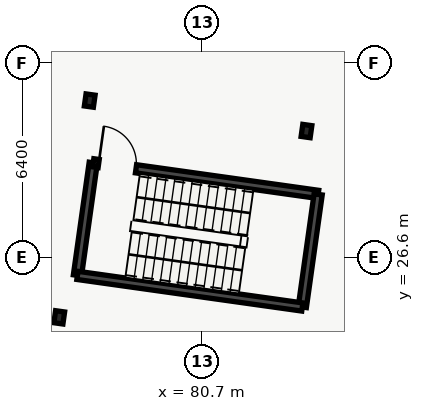
"""IFC4 building model, lengths in metres.
Left out: names, types, materials, properties, quantities, classifications, styles, units other than length and angle.
Written with IfcOpenShell. Run it as: python <this file> out.ifc"""

import sys

from ifc_helpers import new_model, si_unit, direction, frame, frame_2d, origin, origin_2d, place, context, subcontext, project, spatial, rectangle, i_section, extrude, element, fill, save


model = new_model("IFC4")
c1 = context("Model", 3, precision=1e-05, world=origin(), true_north=direction((0.0, 1.0)))
c2 = subcontext(c1, "Body", "Model", "MODEL_VIEW")
j1 = project(units=[si_unit("LENGTHUNIT", "METRE"), si_unit("PLANEANGLEUNIT", "RADIAN")], contexts=[c1])
p1 = place(None, origin())
s1 = spatial("IfcSite", under=j1, at=p1, CompositionType="ELEMENT")
p2 = place(p1, origin())
s2 = spatial("IfcBuilding", under=s1, at=p2, CompositionType="ELEMENT")
p3 = place(p2, frame((0.0, 0.0, -4.8)))
s3 = spatial("IfcBuildingStorey", under=s2, at=p3, CompositionType="ELEMENT", Elevation=-4.8)
for number, where, z_axis, x_axis in (
    (1, (76.002, 24.63, 0.0), (0.0, 0.0, 1.0), (0.99, -0.139, 0.0)),
    (2, (77.004, 31.76, 0.0), (0.0, 0.0, 1.0), (0.99, -0.139, 0.0)),
    (3, (84.134, 30.758, 0.0), (0.0, 0.0, 1.0), (0.99, -0.139, 0.0)),
):
    element("IfcColumn", number, at=place(p3, frame(where, z_axis=z_axis, x_axis=x_axis)), inside=s3, PredefinedType="COLUMN", context=c2, shape_type="SweptSolid", body=[
        extrude(i_section(OverallWidth=0.3, OverallDepth=0.4, WebThickness=0.013, FlangeThickness=0.024, at=origin_2d()), origin(), (0.0, 0.0, 1.0), 4.61),
    ])
p4 = place(p3, frame((76.6, 26.01, 0.0), z_axis=(0.0, 0.0, 1.0), x_axis=(0.139172815303, 0.990268108888, 0.0)))
e4 = element("IfcWall", 4, at=p4, inside=s3, PredefinedType="SHEAR", context=c2, shape_type="SweptSolid", body=[
    extrude(rectangle(XDim=3.74, YDim=0.27, at=frame_2d((1.87, 0.0))), origin(), (0.0, 0.0, 1.0), 4.58),
])
p5 = place(p3, frame((77.12, 29.714, 0.0), z_axis=(0.0, 0.0, 1.0), x_axis=(0.990265308789, -0.139192737628, 0.0)))
e5 = element("IfcWall", 5, at=p5, inside=s3, PredefinedType="SHEAR", context=c2, shape_type="SweptSolid", body=[
    extrude(rectangle(XDim=7.47, YDim=0.27, at=frame_2d((3.735, 0.0))), origin(), (0.0, 0.0, 1.0), 4.58),
])
p6 = place(p5, frame((0.18, 0.0, 0.0)))
e6 = element("IfcOpeningElement", 6, at=p6, cuts=e5, PredefinedType="OPENING", context=c2, shape_type="SweptSolid", body=[
    extrude(rectangle(XDim=1.24, YDim=2.15, at=frame_2d((0.62, 1.075))), frame((0.0, 0.135, 0.0), z_axis=(0.0, -1.0, 0.0), x_axis=(1.0, 0.0, 0.0)), (0.0, 0.0, 1.0), 0.27),
])
p7 = place(p3, frame((84.518, 28.674, 0.0), z_axis=(0.0, 0.0, 1.0), x_axis=(-0.139172815303, -0.990268108888, 0.0)))
e7 = element("IfcWall", 7, at=p7, inside=s3, PredefinedType="SHEAR", context=c2, shape_type="SweptSolid", body=[
    extrude(rectangle(XDim=3.74, YDim=0.27, at=frame_2d((1.87, 0.0))), origin(), (0.0, 0.0, 1.0), 4.58),
])
p8 = place(p3, frame((83.997, 24.97, 0.0), z_axis=(0.0, 0.0, 1.0), x_axis=(-0.990265308789, 0.139192737628, 0.0)))
e8 = element("IfcWall", 8, at=p8, inside=s3, PredefinedType="SHEAR", context=c2, shape_type="SweptSolid", body=[
    extrude(rectangle(XDim=7.47, YDim=0.27, at=frame_2d((3.735, 0.0))), origin(), (0.0, 0.0, 1.0), 4.58),
])
p9 = place(p6, origin())
e9 = element("IfcDoor", 9, at=p9, inside=s3, OperationType="SINGLE_SWING_LEFT", PredefinedType="DOOR", context=c2, shape_type="SweptSolid", body=[
    extrude(rectangle(XDim=1.24, YDim=2.15, at=frame_2d((0.62, 1.075))), frame((0.0, 0.025, 0.0), z_axis=(0.0, -1.0, 0.0), x_axis=(1.0, 0.0, 0.0)), (0.0, 0.0, 1.0), 0.05),
])
fill(e6, e9)
save(model, sys.argv[1])
